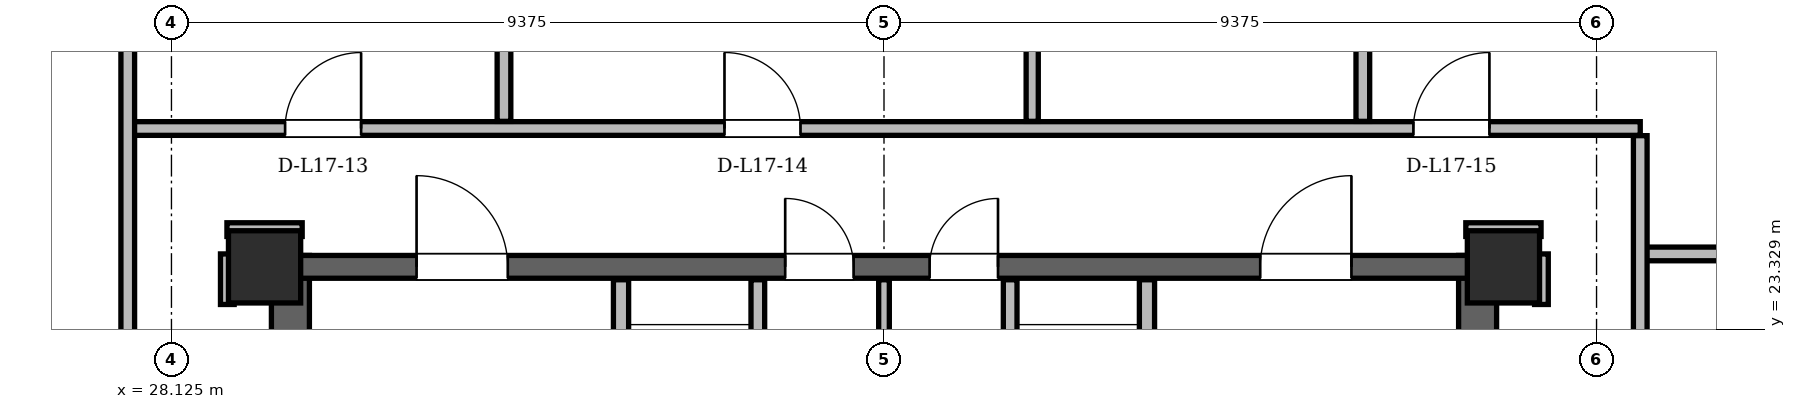
"""IFC4 building model, lengths in metres.
Left out: names, types, materials, properties, quantities, classifications, styles, units other than length and angle.
Written with IfcOpenShell. Run it as: python <this file> out.ifc"""

import sys

from ifc_helpers import new_model, si_unit, direction, frame, frame_2d, origin, origin_2d, place, context, subcontext, project, spatial, rectangle, hollow_rectangle, extrude, element, fill, save


model = new_model("IFC4")
c1 = context("Model", 3, precision=1e-05, world=origin(), true_north=direction((0.0, 1.0)))
c2 = subcontext(c1, "Body", "Model", "MODEL_VIEW")
j1 = project(units=[si_unit("LENGTHUNIT", "METRE"), si_unit("PLANEANGLEUNIT", "RADIAN")], contexts=[c1])
p1 = place(None, origin())
s1 = spatial("IfcSite", under=j1, at=p1, CompositionType="ELEMENT")
p2 = place(p1, origin())
s2 = spatial("IfcBuilding", under=s1, at=p2, CompositionType="ELEMENT")
p3 = place(p2, frame((0.0, 0.0, 66.9)))
s3 = spatial("IfcBuildingStorey", under=s2, at=p3, CompositionType="ELEMENT", Elevation=66.9)
for number, where, z_axis, x_axis in (
    (1, (45.65, 24.15, 0.0), (0.0, 0.0, 1.0), (1.0, 0.0, 0.0)),
    (2, (29.35, 24.15, 0.0), (0.0, 0.0, 1.0), (1.0, 0.0, 0.0)),
):
    element("IfcColumn", number, at=place(p3, frame(where, z_axis=z_axis, x_axis=x_axis)), inside=s3, PredefinedType="COLUMN", context=c2, shape_type="SweptSolid", body=[
        extrude(hollow_rectangle(XDim=0.95, YDim=0.95, WallThickness=0.08, at=origin_2d()), origin(), (0.0, 0.0, 1.0), 3.6),
    ])
for number, where, z_axis, x_axis in (
    (3, (29.69, 11.0, 0.0), (0.0, 0.0, 1.0), (0.0, 1.0, 0.0)),
    (4, (45.31, 11.0, 0.0), (0.0, 0.0, 1.0), (0.0, 1.0, 0.0)),
):
    element("IfcWall", number, at=place(p3, frame(where, z_axis=z_axis, x_axis=x_axis)), inside=s3, PredefinedType="SHEAR", context=c2, shape_type="SweptSolid", body=[
        extrude(rectangle(XDim=13.3, YDim=0.5, at=frame_2d((6.65, 0.0))), origin(), (0.0, 0.0, 1.0), 3.36),
    ])
p4 = place(p3, frame((29.65, 24.15, 0.0), z_axis=(0.0, 0.0, 1.0), x_axis=(1.0, 0.0, 0.0)))
e5 = element("IfcWall", 5, at=p4, inside=s3, PredefinedType="SHEAR", context=c2, shape_type="SweptSolid", body=[
    extrude(rectangle(XDim=15.7, YDim=0.3, at=frame_2d((7.85, 0.0))), origin(), (0.0, 0.0, 1.0), 3.36),
])
p5 = place(p4, frame((1.7, 0.0, 0.0)))
e6 = element("IfcOpeningElement", 6, at=p5, cuts=e5, PredefinedType="OPENING", context=c2, shape_type="SweptSolid", body=[
    extrude(rectangle(XDim=1.2, YDim=2.2, at=frame_2d((0.6, 1.1))), frame((0.0, 0.15, 0.0), z_axis=(0.0, -1.0, 0.0), x_axis=(1.0, 0.0, 0.0)), (0.0, 0.0, 1.0), 0.3),
])
p6 = place(p4, frame((12.8, 0.0, 0.0)))
e7 = element("IfcOpeningElement", 7, at=p6, cuts=e5, PredefinedType="OPENING", context=c2, shape_type="SweptSolid", body=[
    extrude(rectangle(XDim=1.2, YDim=2.2, at=frame_2d((0.6, 1.1))), frame((0.0, 0.15, 0.0), z_axis=(0.0, -1.0, 0.0), x_axis=(1.0, 0.0, 0.0)), (0.0, 0.0, 1.0), 0.3),
])
p7 = place(p4, frame((6.55, 0.0, 0.0)))
e8 = element("IfcOpeningElement", 8, at=p7, cuts=e5, PredefinedType="OPENING", context=c2, shape_type="SweptSolid", body=[
    extrude(rectangle(XDim=0.9, YDim=2.05, at=frame_2d((0.45, 1.025))), frame((0.0, 0.15, 0.0), z_axis=(0.0, -1.0, 0.0), x_axis=(1.0, 0.0, 0.0)), (0.0, 0.0, 1.0), 0.3),
])
p8 = place(p4, frame((8.45, 0.0, 0.0)))
e9 = element("IfcOpeningElement", 9, at=p8, cuts=e5, PredefinedType="OPENING", context=c2, shape_type="SweptSolid", body=[
    extrude(rectangle(XDim=0.9, YDim=2.05, at=frame_2d((0.45, 1.025))), frame((0.0, 0.15, 0.0), z_axis=(0.0, -1.0, 0.0), x_axis=(1.0, 0.0, 0.0)), (0.0, 0.0, 1.0), 0.3),
])
p9 = place(p3, frame((61.212, 14.297, 0.0), z_axis=(0.0, 0.0, 1.0), x_axis=(-0.499997235847, 0.866026999663, 0.0)))
e10 = element("IfcWall", 10, at=p9, inside=s3, PredefinedType="SOLIDWALL", context=c2, shape_type="SweptSolid", body=[
    extrude(rectangle(XDim=33.763, YDim=0.34, at=frame_2d((16.882, 0.0))), origin(), (0.0, 0.0, 1.0), 2.494),
])
p10 = place(p9, frame((7.615, 0.0, 0.0)))
e11 = element("IfcOpeningElement", 11, at=p10, cuts=e10, PredefinedType="OPENING", context=c2, shape_type="SweptSolid", body=[
    extrude(rectangle(XDim=1.5, YDim=2.2, at=frame_2d((0.75, 1.1))), frame((0.0, 0.17, 0.0), z_axis=(0.0, -1.0, 0.0), x_axis=(1.0, 0.0, 0.0)), (0.0, 0.0, 1.0), 0.34),
])
p11 = place(p9, frame((25.894, 0.0, 0.0)))
e12 = element("IfcOpeningElement", 12, at=p11, cuts=e10, PredefinedType="OPENING", context=c2, shape_type="SweptSolid", body=[
    extrude(rectangle(XDim=1.5, YDim=2.2, at=frame_2d((0.75, 1.1))), frame((0.0, 0.17, 0.0), z_axis=(0.0, -1.0, 0.0), x_axis=(1.0, 0.0, 0.0)), (0.0, 0.0, 1.0), 0.34),
])
p12 = place(p9, frame((1.594, 0.0, 0.85)))
e13 = element("IfcOpeningElement", 13, at=p12, cuts=e10, PredefinedType="OPENING", context=c2, shape_type="SweptSolid", body=[
    extrude(rectangle(XDim=1.4, YDim=1.534, at=frame_2d((0.7, 0.767))), frame((0.0, 0.17, 0.0), z_axis=(0.0, -1.0, 0.0), x_axis=(1.0, 0.0, 0.0)), (0.0, 0.0, 1.0), 0.34),
])
p13 = place(p9, frame((20.533, 0.0, 0.85)))
e14 = element("IfcOpeningElement", 14, at=p13, cuts=e10, PredefinedType="OPENING", context=c2, shape_type="SweptSolid", body=[
    extrude(rectangle(XDim=1.2, YDim=1.48, at=frame_2d((0.6, 0.74))), frame((0.0, 0.17, 0.0), z_axis=(0.0, -1.0, 0.0), x_axis=(1.0, 0.0, 0.0)), (0.0, 0.0, 1.0), 0.34),
])
p14 = place(p9, frame((29.7, 0.0, 0.85)))
e15 = element("IfcOpeningElement", 15, at=p14, cuts=e10, PredefinedType="OPENING", context=c2, shape_type="SweptSolid", body=[
    extrude(rectangle(XDim=2.2, YDim=1.534, at=frame_2d((1.1, 0.767))), frame((0.0, 0.17, 0.0), z_axis=(0.0, -1.0, 0.0), x_axis=(1.0, 0.0, 0.0)), (0.0, 0.0, 1.0), 0.34),
])
p15 = place(p9, frame((15.112, 0.0, 0.85)))
e16 = element("IfcOpeningElement", 16, at=p15, cuts=e10, PredefinedType="OPENING", context=c2, shape_type="SweptSolid", body=[
    extrude(rectangle(XDim=1.2, YDim=1.48, at=frame_2d((0.6, 0.74))), frame((0.0, 0.17, 0.0), z_axis=(0.0, -1.0, 0.0), x_axis=(1.0, 0.0, 0.0)), (0.0, 0.0, 1.0), 0.34),
])
p16 = place(p9, frame((17.864, 0.0, 0.85)))
e17 = element("IfcOpeningElement", 17, at=p16, cuts=e10, PredefinedType="OPENING", context=c2, shape_type="SweptSolid", body=[
    extrude(rectangle(XDim=1.2, YDim=1.48, at=frame_2d((0.6, 0.74))), frame((0.0, 0.17, 0.0), z_axis=(0.0, -1.0, 0.0), x_axis=(1.0, 0.0, 0.0)), (0.0, 0.0, 1.0), 0.34),
])
p17 = place(p3, frame((30.669, 43.537, 0.0), z_axis=(0.0, 0.0, 1.0), x_axis=(-0.499997235847, -0.866026999663, 0.0)))
e18 = element("IfcWall", 18, at=p17, inside=s3, PredefinedType="SOLIDWALL", context=c2, shape_type="SweptSolid", body=[
    extrude(rectangle(XDim=33.763, YDim=0.34, at=frame_2d((16.882, 0.0))), origin(), (0.0, 0.0, 1.0), 2.494),
])
p18 = place(p17, frame((7.924, 0.0, 0.0)))
e19 = element("IfcOpeningElement", 19, at=p18, cuts=e18, PredefinedType="OPENING", context=c2, shape_type="SweptSolid", body=[
    extrude(rectangle(XDim=1.3, YDim=2.2, at=frame_2d((0.65, 1.1))), frame((0.0, 0.17, 0.0), z_axis=(0.0, -1.0, 0.0), x_axis=(1.0, 0.0, 0.0)), (0.0, 0.0, 1.0), 0.34),
])
p19 = place(p17, frame((29.254, 0.0, 0.0)))
e20 = element("IfcOpeningElement", 20, at=p19, cuts=e18, PredefinedType="OPENING", context=c2, shape_type="SweptSolid", body=[
    extrude(rectangle(XDim=1.5, YDim=2.2, at=frame_2d((0.75, 1.1))), frame((0.0, 0.17, 0.0), z_axis=(0.0, -1.0, 0.0), x_axis=(1.0, 0.0, 0.0)), (0.0, 0.0, 1.0), 0.34),
])
p20 = place(p17, frame((12.199, 0.0, 0.85)))
e21 = element("IfcOpeningElement", 21, at=p20, cuts=e18, PredefinedType="OPENING", context=c2, shape_type="SweptSolid", body=[
    extrude(rectangle(XDim=1.8, YDim=1.534, at=frame_2d((0.9, 0.767))), frame((0.0, 0.17, 0.0), z_axis=(0.0, -1.0, 0.0), x_axis=(1.0, 0.0, 0.0)), (0.0, 0.0, 1.0), 0.34),
])
p21 = place(p17, frame((19.181, 0.0, 0.85)))
e22 = element("IfcOpeningElement", 22, at=p21, cuts=e18, PredefinedType="OPENING", context=c2, shape_type="SweptSolid", body=[
    extrude(rectangle(XDim=1.2, YDim=1.48, at=frame_2d((0.6, 0.74))), frame((0.0, 0.17, 0.0), z_axis=(0.0, -1.0, 0.0), x_axis=(1.0, 0.0, 0.0)), (0.0, 0.0, 1.0), 0.34),
])
p22 = place(p17, frame((1.231, 0.0, 0.85)))
e23 = element("IfcOpeningElement", 23, at=p22, cuts=e18, PredefinedType="OPENING", context=c2, shape_type="SweptSolid", body=[
    extrude(rectangle(XDim=1.8, YDim=1.534, at=frame_2d((0.9, 0.767))), frame((0.0, 0.17, 0.0), z_axis=(0.0, -1.0, 0.0), x_axis=(1.0, 0.0, 0.0)), (0.0, 0.0, 1.0), 0.34),
])
p23 = place(p3, frame((34.04, 19.48, 0.0), z_axis=(0.0, 0.0, 1.0), x_axis=(0.0, 1.0, 0.0)))
e24 = element("IfcWall", 24, at=p23, inside=s3, PredefinedType="PARTITIONING", context=c2, shape_type="SweptSolid", body=[
    extrude(rectangle(XDim=4.5, YDim=0.2, at=frame_2d((2.25, 0.0))), origin(), (0.0, 0.0, 1.0), 2.4),
])
p24 = place(p23, frame((2.12, 0.0, 0.0)))
e25 = element("IfcOpeningElement", 25, at=p24, cuts=e24, PredefinedType="OPENING", context=c2, shape_type="SweptSolid", body=[
    extrude(rectangle(XDim=1.1, YDim=2.2, at=frame_2d((0.55, 1.1))), frame((0.0, 0.1, 0.0), z_axis=(0.0, -1.0, 0.0), x_axis=(1.0, 0.0, 0.0)), (0.0, 0.0, 1.0), 0.2),
])
p25 = place(p3, frame((35.84, 20.96, 0.0), z_axis=(0.0, 0.0, 1.0), x_axis=(0.0, 1.0, 0.0)))
e26 = element("IfcWall", 26, at=p25, inside=s3, PredefinedType="PARTITIONING", context=c2, shape_type="SweptSolid", body=[
    extrude(rectangle(XDim=3.02, YDim=0.18, at=frame_2d((1.51, 0.0))), origin(), (0.0, 0.0, 1.0), 2.4),
])
p26 = place(p3, frame((40.96, 19.48, 0.0), z_axis=(0.0, 0.0, 1.0), x_axis=(0.0, 1.0, 0.0)))
e27 = element("IfcWall", 27, at=p26, inside=s3, PredefinedType="PARTITIONING", context=c2, shape_type="SweptSolid", body=[
    extrude(rectangle(XDim=4.5, YDim=0.2, at=frame_2d((2.25, 0.0))), origin(), (0.0, 0.0, 1.0), 2.4),
])
p27 = place(p26, frame((2.12, 0.0, 0.0)))
e28 = element("IfcOpeningElement", 28, at=p27, cuts=e27, PredefinedType="OPENING", context=c2, shape_type="SweptSolid", body=[
    extrude(rectangle(XDim=1.1, YDim=2.2, at=frame_2d((0.55, 1.1))), frame((0.0, 0.1, 0.0), z_axis=(0.0, -1.0, 0.0), x_axis=(1.0, 0.0, 0.0)), (0.0, 0.0, 1.0), 0.2),
])
p28 = place(p3, frame((39.16, 20.96, 0.0), z_axis=(0.0, 0.0, 1.0), x_axis=(0.0, 1.0, 0.0)))
e29 = element("IfcWall", 29, at=p28, inside=s3, PredefinedType="PARTITIONING", context=c2, shape_type="SweptSolid", body=[
    extrude(rectangle(XDim=3.02, YDim=0.18, at=frame_2d((1.51, 0.0))), origin(), (0.0, 0.0, 1.0), 2.4),
])
p29 = place(p3, frame((37.5, 21.06, 0.0), z_axis=(0.0, 0.0, 1.0), x_axis=(0.0, 1.0, 0.0)))
e30 = element("IfcWall", 30, at=p29, inside=s3, PredefinedType="PARTITIONING", context=c2, shape_type="SweptSolid", body=[
    extrude(rectangle(XDim=2.92, YDim=0.14, at=frame_2d((1.46, 0.0))), origin(), (0.0, 0.0, 1.0), 2.4),
])
p30 = place(p3, frame((47.45, 24.32, 0.0), z_axis=(0.0, 0.0, 1.0), x_axis=(1.0, 0.0, 0.0)))
e31 = element("IfcWall", 31, at=p30, inside=s3, PredefinedType="PARTITIONING", context=c2, shape_type="SweptSolid", body=[
    extrude(rectangle(XDim=7.775, YDim=0.18, at=frame_2d((3.887, 0.0))), origin(), (0.0, 0.0, 1.0), 3.36),
])
for number, where, z_axis, x_axis in (
    (32, (28.855, 24.64, 0.0), (0.0, 0.0, 1.0), (1.0, 0.0, 0.0)),
    (33, (45.155, 24.64, 0.0), (0.0, 0.0, 1.0), (1.0, 0.0, 0.0)),
):
    element("IfcWall", number, at=place(p3, frame(where, z_axis=z_axis, x_axis=x_axis)), inside=s3, PredefinedType="PARTITIONING", context=c2, shape_type="SweptSolid", body=[
        extrude(rectangle(XDim=0.99, YDim=0.18, at=frame_2d((0.495, 0.0))), origin(), (0.0, 0.0, 1.0), 2.738),
    ])
p31 = place(p3, frame((27.55, 25.97, 0.0), z_axis=(0.0, 0.0, 1.0), x_axis=(1.0, 0.0, 0.0)))
e34 = element("IfcWall", 34, at=p31, inside=s3, PredefinedType="PARTITIONING", context=c2, shape_type="SweptSolid", body=[
    extrude(rectangle(XDim=19.9, YDim=0.18, at=frame_2d((9.95, 0.0))), origin(), (0.0, 0.0, 1.0), 2.738),
])
p32 = place(p31, frame((2.07, 0.0, 0.0)))
e35 = element("IfcOpeningElement", 35, at=p32, cuts=e34, PredefinedType="OPENING", context=c2, shape_type="SweptSolid", body=[
    extrude(rectangle(XDim=1.0, YDim=2.18, at=frame_2d((0.5, 1.09))), frame((0.0, 0.09, 0.0), z_axis=(0.0, -1.0, 0.0), x_axis=(1.0, 0.0, 0.0)), (0.0, 0.0, 1.0), 0.18),
])
p33 = place(p31, frame((7.851, 0.0, 0.0)))
e36 = element("IfcOpeningElement", 36, at=p33, cuts=e34, PredefinedType="OPENING", context=c2, shape_type="SweptSolid", body=[
    extrude(rectangle(XDim=1.0, YDim=2.18, at=frame_2d((0.5, 1.09))), frame((0.0, 0.09, 0.0), z_axis=(0.0, -1.0, 0.0), x_axis=(1.0, 0.0, 0.0)), (0.0, 0.0, 1.0), 0.18),
])
p34 = place(p31, frame((16.916, 0.0, 0.0)))
e37 = element("IfcOpeningElement", 37, at=p34, cuts=e34, PredefinedType="OPENING", context=c2, shape_type="SweptSolid", body=[
    extrude(rectangle(XDim=1.0, YDim=2.18, at=frame_2d((0.5, 1.09))), frame((0.0, 0.09, 0.0), z_axis=(0.0, -1.0, 0.0), x_axis=(1.0, 0.0, 0.0)), (0.0, 0.0, 1.0), 0.18),
])
p35 = place(p3, frame((27.55, 11.044, 0.0), z_axis=(0.0, 0.0, 1.0), x_axis=(0.0, 1.0, 0.0)))
e38 = element("IfcWall", 38, at=p35, inside=s3, PredefinedType="PARTITIONING", context=c2, shape_type="SweptSolid", body=[
    extrude(rectangle(XDim=26.742, YDim=0.18, at=frame_2d((13.371, 0.0))), origin(), (0.0, 0.0, 1.0), 2.494),
])
p36 = place(p35, frame((10.795, 0.0, 0.0)))
e39 = element("IfcOpeningElement", 39, at=p36, cuts=e38, PredefinedType="OPENING", context=c2, shape_type="SweptSolid", body=[
    extrude(rectangle(XDim=1.0, YDim=2.18, at=frame_2d((0.5, 1.09))), frame((0.0, 0.09, 0.0), z_axis=(0.0, -1.0, 0.0), x_axis=(1.0, 0.0, 0.0)), (0.0, 0.0, 1.0), 0.18),
])
p37 = place(p3, frame((28.86, 23.655, 0.0), z_axis=(0.0, 0.0, 1.0), x_axis=(0.0, 1.0, 0.0)))
e40 = element("IfcWall", 40, at=p37, inside=s3, PredefinedType="PARTITIONING", context=c2, shape_type="SweptSolid", body=[
    extrude(rectangle(XDim=0.665, YDim=0.18, at=frame_2d((0.333, 0.0))), origin(), (0.0, 0.0, 1.0), 2.946),
])
p38 = place(p3, frame((32.5, 26.064, 0.0), z_axis=(0.0, 0.0, 1.0), x_axis=(0.0, 1.0, 0.0)))
e41 = element("IfcWall", 41, at=p38, inside=s3, PredefinedType="PARTITIONING", context=c2, shape_type="SweptSolid", body=[
    extrude(rectangle(XDim=17.299, YDim=0.18, at=frame_2d((8.649, 0.0))), origin(), (0.0, 0.0, 1.0), 3.36),
])
p39 = place(p3, frame((39.45, 26.064, 0.0), z_axis=(0.0, 0.0, 1.0), x_axis=(0.0, 1.0, 0.0)))
e42 = element("IfcWall", 42, at=p39, inside=s3, PredefinedType="PARTITIONING", context=c2, shape_type="SweptSolid", body=[
    extrude(rectangle(XDim=17.299, YDim=0.16, at=frame_2d((8.649, 0.0))), origin(), (0.0, 0.0, 1.0), 3.36),
])
p40 = place(p39, frame((1.442, 0.0, 0.0)))
e43 = element("IfcOpeningElement", 43, at=p40, cuts=e42, PredefinedType="OPENING", context=c2, shape_type="SweptSolid", body=[
    extrude(rectangle(XDim=0.92, YDim=2.12, at=frame_2d((0.46, 1.06))), frame((0.0, 0.08, 0.0), z_axis=(0.0, -1.0, 0.0), x_axis=(1.0, 0.0, 0.0)), (0.0, 0.0, 1.0), 0.16),
])
p41 = place(p39, frame((5.359, 0.0, 0.0)))
e44 = element("IfcOpeningElement", 44, at=p41, cuts=e42, PredefinedType="OPENING", context=c2, shape_type="SweptSolid", body=[
    extrude(rectangle(XDim=0.92, YDim=2.12, at=frame_2d((0.46, 1.06))), frame((0.0, 0.08, 0.0), z_axis=(0.0, -1.0, 0.0), x_axis=(1.0, 0.0, 0.0)), (0.0, 0.0, 1.0), 0.16),
])
p42 = place(p39, frame((8.721, 0.0, 0.0)))
e45 = element("IfcOpeningElement", 45, at=p42, cuts=e42, PredefinedType="OPENING", context=c2, shape_type="SweptSolid", body=[
    extrude(rectangle(XDim=0.95, YDim=2.1, at=frame_2d((0.475, 1.05))), frame((0.0, 0.08, 0.0), z_axis=(0.0, -1.0, 0.0), x_axis=(1.0, 0.0, 0.0)), (0.0, 0.0, 1.0), 0.16),
])
p43 = place(p39, frame((11.557, 0.0, 0.0)))
e46 = element("IfcOpeningElement", 46, at=p43, cuts=e42, PredefinedType="OPENING", context=c2, shape_type="SweptSolid", body=[
    extrude(rectangle(XDim=0.95, YDim=2.1, at=frame_2d((0.475, 1.05))), frame((0.0, 0.08, 0.0), z_axis=(0.0, -1.0, 0.0), x_axis=(1.0, 0.0, 0.0)), (0.0, 0.0, 1.0), 0.16),
])
p44 = place(p39, frame((13.933, 0.0, 0.0)))
e47 = element("IfcOpeningElement", 47, at=p44, cuts=e42, PredefinedType="OPENING", context=c2, shape_type="SweptSolid", body=[
    extrude(rectangle(XDim=0.95, YDim=2.1, at=frame_2d((0.475, 1.05))), frame((0.0, 0.08, 0.0), z_axis=(0.0, -1.0, 0.0), x_axis=(1.0, 0.0, 0.0)), (0.0, 0.0, 1.0), 0.16),
])
p45 = place(p39, frame((15.953, 0.0, 0.0)))
e48 = element("IfcOpeningElement", 48, at=p45, cuts=e42, PredefinedType="OPENING", context=c2, shape_type="SweptSolid", body=[
    extrude(rectangle(XDim=0.88, YDim=2.08, at=frame_2d((0.44, 1.04))), frame((0.0, 0.08, 0.0), z_axis=(0.0, -1.0, 0.0), x_axis=(1.0, 0.0, 0.0)), (0.0, 0.0, 1.0), 0.16),
])
p46 = place(p3, frame((43.8, 26.064, 0.0), z_axis=(0.0, 0.0, 1.0), x_axis=(0.0, 1.0, 0.0)))
e49 = element("IfcWall", 49, at=p46, inside=s3, PredefinedType="PARTITIONING", context=c2, shape_type="SweptSolid", body=[
    extrude(rectangle(XDim=17.299, YDim=0.18, at=frame_2d((8.649, 0.0))), origin(), (0.0, 0.0, 1.0), 3.36),
])
p47 = place(p3, frame((46.15, 23.655, 0.0), z_axis=(0.0, 0.0, 1.0), x_axis=(0.0, 1.0, 0.0)))
e50 = element("IfcWall", 50, at=p47, inside=s3, PredefinedType="PARTITIONING", context=c2, shape_type="SweptSolid", body=[
    extrude(rectangle(XDim=0.665, YDim=0.18, at=frame_2d((0.333, 0.0))), origin(), (0.0, 0.0, 1.0), 2.946),
])
p48 = place(p3, frame((47.45, 11.044, 0.0), z_axis=(0.0, 0.0, 1.0), x_axis=(0.0, 1.0, 0.0)))
e51 = element("IfcWall", 51, at=p48, inside=s3, PredefinedType="PARTITIONING", context=c2, shape_type="SweptSolid", body=[
    extrude(rectangle(XDim=14.832, YDim=0.18, at=frame_2d((7.416, 0.0))), origin(), (0.0, 0.0, 1.0), 2.738),
])
p49 = place(p48, frame((6.079, 0.0, 0.0)))
e52 = element("IfcOpeningElement", 52, at=p49, cuts=e51, PredefinedType="OPENING", context=c2, shape_type="SweptSolid", body=[
    extrude(rectangle(XDim=1.0, YDim=2.18, at=frame_2d((0.5, 1.09))), frame((0.0, 0.09, 0.0), z_axis=(0.0, -1.0, 0.0), x_axis=(1.0, 0.0, 0.0)), (0.0, 0.0, 1.0), 0.18),
])
p50 = place(p48, frame((10.668, 0.0, 0.0)))
e53 = element("IfcOpeningElement", 53, at=p50, cuts=e51, PredefinedType="OPENING", context=c2, shape_type="SweptSolid", body=[
    extrude(rectangle(XDim=1.0, YDim=2.18, at=frame_2d((0.5, 1.09))), frame((0.0, 0.09, 0.0), z_axis=(0.0, -1.0, 0.0), x_axis=(1.0, 0.0, 0.0)), (0.0, 0.0, 1.0), 0.18),
])
p51 = place(p5, origin())
e54 = element("IfcDoor", 54, at=p51, inside=s3, OperationType="SINGLE_SWING_LEFT", PredefinedType="DOOR", context=c2, shape_type="SweptSolid", body=[
    extrude(rectangle(XDim=1.2, YDim=2.2, at=frame_2d((0.6, 1.1))), frame((0.0, 0.025, 0.0), z_axis=(0.0, -1.0, 0.0), x_axis=(1.0, 0.0, 0.0)), (0.0, 0.0, 1.0), 0.05),
])
fill(e6, e54)
p52 = place(p6, origin())
e55 = element("IfcDoor", 55, at=p52, inside=s3, OperationType="SINGLE_SWING_RIGHT", PredefinedType="DOOR", context=c2, shape_type="SweptSolid", body=[
    extrude(rectangle(XDim=1.2, YDim=2.2, at=frame_2d((0.6, 1.1))), frame((0.0, 0.025, 0.0), z_axis=(0.0, -1.0, 0.0), x_axis=(1.0, 0.0, 0.0)), (0.0, 0.0, 1.0), 0.05),
])
fill(e7, e55)
p53 = place(p7, origin())
e56 = element("IfcDoor", 56, at=p53, inside=s3, OperationType="SINGLE_SWING_LEFT", PredefinedType="DOOR", context=c2, shape_type="SweptSolid", body=[
    extrude(rectangle(XDim=0.9, YDim=2.05, at=frame_2d((0.45, 1.025))), frame((0.0, 0.025, 0.0), z_axis=(0.0, -1.0, 0.0), x_axis=(1.0, 0.0, 0.0)), (0.0, 0.0, 1.0), 0.05),
])
fill(e8, e56)
p54 = place(p8, origin())
e57 = element("IfcDoor", 57, at=p54, inside=s3, OperationType="SINGLE_SWING_RIGHT", PredefinedType="DOOR", context=c2, shape_type="SweptSolid", body=[
    extrude(rectangle(XDim=0.9, YDim=2.05, at=frame_2d((0.45, 1.025))), frame((0.0, 0.025, 0.0), z_axis=(0.0, -1.0, 0.0), x_axis=(1.0, 0.0, 0.0)), (0.0, 0.0, 1.0), 0.05),
])
fill(e9, e57)
p55 = place(p32, origin())
e58 = element("IfcDoor", 58, at=p55, inside=s3, OperationType="SINGLE_SWING_RIGHT", PredefinedType="DOOR", context=c2, shape_type="SweptSolid", body=[
    extrude(rectangle(XDim=1.0, YDim=2.18, at=frame_2d((0.5, 1.09))), frame((0.0, 0.025, 0.0), z_axis=(0.0, -1.0, 0.0), x_axis=(1.0, 0.0, 0.0)), (0.0, 0.0, 1.0), 0.05),
])
fill(e35, e58)
p56 = place(p33, origin())
e59 = element("IfcDoor", 59, at=p56, inside=s3, OperationType="SINGLE_SWING_LEFT", PredefinedType="DOOR", context=c2, shape_type="SweptSolid", body=[
    extrude(rectangle(XDim=1.0, YDim=2.18, at=frame_2d((0.5, 1.09))), frame((0.0, 0.025, 0.0), z_axis=(0.0, -1.0, 0.0), x_axis=(1.0, 0.0, 0.0)), (0.0, 0.0, 1.0), 0.05),
])
fill(e36, e59)
p57 = place(p34, origin())
e60 = element("IfcDoor", 60, at=p57, inside=s3, OperationType="SINGLE_SWING_RIGHT", PredefinedType="DOOR", context=c2, shape_type="SweptSolid", body=[
    extrude(rectangle(XDim=1.0, YDim=2.18, at=frame_2d((0.5, 1.09))), frame((0.0, 0.025, 0.0), z_axis=(0.0, -1.0, 0.0), x_axis=(1.0, 0.0, 0.0)), (0.0, 0.0, 1.0), 0.05),
])
fill(e37, e60)
save(model, sys.argv[1])
